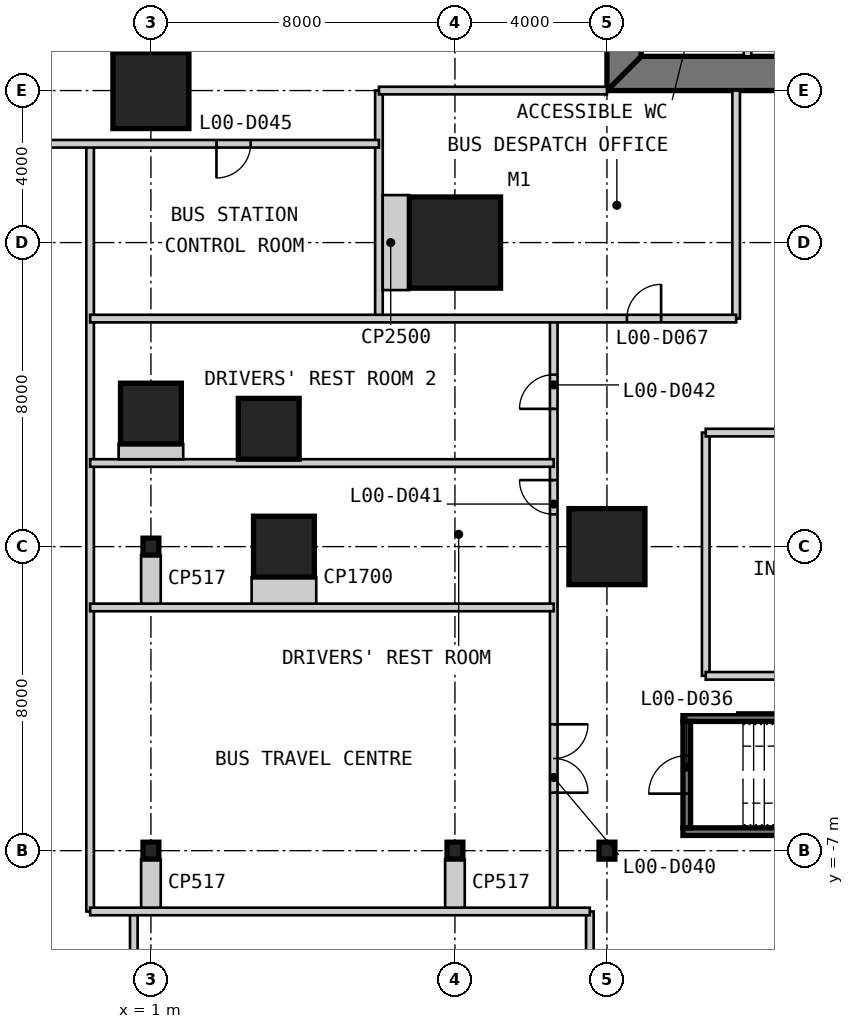
"""IFC4 building model, lengths in metres.
Left out: names, types, materials, properties, quantities, classifications, styles, units other than length and angle.
Written with IfcOpenShell. Run it as: python <this file> out.ifc"""

import sys

from ifc_helpers import new_model, si_unit, direction, frame, frame_2d, origin, origin_2d, place, context, subcontext, project, spatial, polyline, rectangle, i_section, outline, extrude, element, fill, save


model = new_model("IFC4")
c1 = context("Model", 3, precision=1e-05, world=origin(), true_north=direction((0.0, 1.0)))
c2 = subcontext(c1, "Body", "Model", "MODEL_VIEW")
j1 = project(units=[si_unit("LENGTHUNIT", "METRE"), si_unit("PLANEANGLEUNIT", "RADIAN")], contexts=[c1])
p1 = place(None, origin())
s1 = spatial("IfcSite", under=j1, at=p1, CompositionType="ELEMENT")
p2 = place(p1, origin())
s2 = spatial("IfcBuilding", under=s1, at=p2, CompositionType="ELEMENT")
p3 = place(p2, origin())
s3 = spatial("IfcBuildingStorey", under=s2, at=p3, CompositionType="ELEMENT", Elevation=0.0)
p4 = place(p3, frame((9.0, 9.0, 0.0), z_axis=(0.0, 0.0, 1.0), x_axis=(1.0, 0.0, 0.0)))
e1 = element("IfcColumn", 1, at=p4, inside=s3, PredefinedType="COLUMN", context=c2, shape_type="SweptSolid", body=[
    extrude(rectangle(XDim=2.4, YDim=2.4, at=origin_2d()), origin(), (0.0, 0.0, 1.0), 7.0),
])
p5 = place(p3, frame((4.5, 1.0, 0.0), z_axis=(0.0, 0.0, 1.0), x_axis=(1.0, 0.0, 0.0)))
e2 = element("IfcColumn", 2, at=p5, inside=s3, PredefinedType="COLUMN", context=c2, shape_type="SweptSolid", body=[
    extrude(rectangle(XDim=1.6, YDim=1.6, at=origin_2d()), origin(), (0.0, 0.0, 1.0), 7.0),
])
for number, where, z_axis, x_axis in (
    (3, (13.0, 1.0, 0.0), (0.0, 0.0, 1.0), (1.0, 0.0, 0.0)),
    (4, (1.0, 13.0, 0.0), (0.0, 0.0, 1.0), (1.0, 0.0, 0.0)),
):
    element("IfcColumn", number, at=place(p3, frame(where, z_axis=z_axis, x_axis=x_axis)), inside=s3, PredefinedType="COLUMN", context=c2, shape_type="SweptSolid", body=[
        extrude(rectangle(XDim=2.0, YDim=2.0, at=origin_2d()), origin(), (0.0, 0.0, 1.0), 7.0),
    ])
for number, where, z_axis, x_axis in (
    (5, (1.0, 4.5, 0.0), (0.0, 0.0, 1.0), (1.0, 0.0, 0.0)),
    (6, (4.1, 4.1, 0.0), (0.0, 0.0, 1.0), (1.0, 0.0, 0.0)),
):
    element("IfcColumn", number, at=place(p3, frame(where, z_axis=z_axis, x_axis=x_axis)), inside=s3, PredefinedType="COLUMN", context=c2, shape_type="SweptSolid", body=[
        extrude(rectangle(XDim=1.6, YDim=1.6, at=origin_2d()), origin(), (0.0, 0.0, 1.0), 7.0),
    ])
for number, where, z_axis, x_axis in (
    (7, (1.0, -7.0, 0.0), (0.0, 0.0, 1.0), (1.0, 0.0, 0.0)),
    (8, (1.0, 1.0, 0.0), (0.0, 0.0, 1.0), (1.0, 0.0, 0.0)),
    (9, (9.0, -7.0, 0.0), (0.0, 0.0, 1.0), (1.0, 0.0, 0.0)),
    (10, (13.0, -7.0, 0.0), (0.0, 0.0, 1.0), (1.0, 0.0, 0.0)),
):
    element("IfcColumn", number, at=place(p3, frame(where, z_axis=z_axis, x_axis=x_axis)), inside=s3, PredefinedType="COLUMN", context=c2, shape_type="SweptSolid", body=[
        extrude(i_section(OverallWidth=0.417, OverallDepth=0.445, WebThickness=0.039, FlangeThickness=0.063, at=origin_2d()), origin(), (0.0, 0.0, 1.0), 7.0),
    ])
p6 = place(p3, frame((13.0, 13.45, 0.0), z_axis=(0.0, 0.0, 1.0), x_axis=(1.0, 0.0, 0.0)))
e11 = element("IfcWall", 11, at=p6, inside=s3, PredefinedType="SHEAR", context=c2, shape_type="SweptSolid", body=[
    extrude(outline(polyline([(0.0, -0.45), (24.0, -0.45), (23.1, 0.45), (0.9, 0.45), (0.0, -0.45)])), origin(), (0.0, 0.0, 1.0), 7.0),
])
p7 = place(p6, frame((4.9, 0.0, 0.0)))
e12 = element("IfcOpeningElement", 12, at=p7, cuts=e11, PredefinedType="OPENING", context=c2, shape_type="SweptSolid", body=[
    extrude(rectangle(XDim=1.0, YDim=2.2, at=frame_2d((0.5, 1.1))), frame((0.0, 0.46, 0.0), z_axis=(0.0, -1.0, 0.0), x_axis=(1.0, 0.0, 0.0)), (0.0, 0.0, 1.0), 0.92),
])
p8 = place(p6, frame((8.9, 0.0, 0.0)))
e13 = element("IfcOpeningElement", 13, at=p8, cuts=e11, PredefinedType="OPENING", context=c2, shape_type="SweptSolid", body=[
    extrude(rectangle(XDim=1.1, YDim=2.2, at=frame_2d((0.55, 1.1))), frame((0.0, 0.46, 0.0), z_axis=(0.0, -1.0, 0.0), x_axis=(1.0, 0.0, 0.0)), (0.0, 0.0, 1.0), 0.92),
])
p9 = place(p6, frame((15.05, 0.0, 0.0)))
e14 = element("IfcOpeningElement", 14, at=p9, cuts=e11, PredefinedType="OPENING", context=c2, shape_type="SweptSolid", body=[
    extrude(rectangle(XDim=0.9, YDim=2.2, at=frame_2d((0.45, 1.1))), frame((0.0, 0.46, 0.0), z_axis=(0.0, -1.0, 0.0), x_axis=(1.0, 0.0, 0.0)), (0.0, 0.0, 1.0), 0.92),
])
p10 = place(p6, frame((17.9, 0.0, 0.0)))
e15 = element("IfcOpeningElement", 15, at=p10, cuts=e11, PredefinedType="OPENING", context=c2, shape_type="SweptSolid", body=[
    extrude(rectangle(XDim=1.0, YDim=2.2, at=frame_2d((0.5, 1.1))), frame((0.0, 0.46, 0.0), z_axis=(0.0, -1.0, 0.0), x_axis=(1.0, 0.0, 0.0)), (0.0, 0.0, 1.0), 0.92),
])
p11 = place(p6, frame((21.4, 0.0, 0.0)))
e16 = element("IfcOpeningElement", 16, at=p11, cuts=e11, PredefinedType="OPENING", context=c2, shape_type="SweptSolid", body=[
    extrude(rectangle(XDim=1.0, YDim=2.2, at=frame_2d((0.5, 1.1))), frame((0.0, 0.46, 0.0), z_axis=(0.0, -1.0, 0.0), x_axis=(1.0, 0.0, 0.0)), (0.0, 0.0, 1.0), 0.92),
])
p12 = place(p3, frame((13.45, 36.1, 0.0), z_axis=(0.0, 0.0, 1.0), x_axis=(0.0, -1.0, 0.0)))
e17 = element("IfcWall", 17, at=p12, inside=s3, PredefinedType="SHEAR", context=c2, shape_type="SweptSolid", body=[
    extrude(outline(polyline([(-0.9, -0.45), (23.1, -0.45), (22.2, 0.45), (0.0, 0.45), (-0.9, -0.45)])), origin(), (0.0, 0.0, 1.0), 7.0),
])
p13 = place(p12, frame((20.2, 0.0, 0.0)))
e18 = element("IfcOpeningElement", 18, at=p13, cuts=e17, PredefinedType="OPENING", context=c2, shape_type="SweptSolid", body=[
    extrude(rectangle(XDim=1.0, YDim=2.2, at=frame_2d((0.5, 1.1))), frame((0.0, 0.46, 0.0), z_axis=(0.0, -1.0, 0.0), x_axis=(1.0, 0.0, 0.0)), (0.0, 0.0, 1.0), 0.92),
])
p14 = place(p12, frame((17.25, 0.0, 0.0)))
e19 = element("IfcOpeningElement", 19, at=p14, cuts=e17, PredefinedType="OPENING", context=c2, shape_type="SweptSolid", body=[
    extrude(rectangle(XDim=0.9, YDim=2.2, at=frame_2d((0.45, 1.1))), frame((0.0, 0.46, 0.0), z_axis=(0.0, -1.0, 0.0), x_axis=(1.0, 0.0, 0.0)), (0.0, 0.0, 1.0), 0.92),
])
p15 = place(p3, frame((16.7, 13.9, 0.0), z_axis=(0.0, 0.0, 1.0), x_axis=(0.0, 1.0, 0.0)))
e20 = element("IfcWall", 20, at=p15, inside=s3, PredefinedType="PARTITIONING", context=c2, shape_type="SweptSolid", body=[
    extrude(rectangle(XDim=16.1, YDim=0.2, at=frame_2d((8.05, 0.0))), origin(), (0.0, 0.0, 1.0), 6.8),
])
p16 = place(p15, frame((3.8, 0.0, 0.0)))
e21 = element("IfcOpeningElement", 21, at=p16, cuts=e20, PredefinedType="OPENING", context=c2, shape_type="SweptSolid", body=[
    extrude(rectangle(XDim=0.9, YDim=2.2, at=frame_2d((0.45, 1.1))), frame((0.0, 0.11, 0.0), z_axis=(0.0, -1.0, 0.0), x_axis=(1.0, 0.0, 0.0)), (0.0, 0.0, 1.0), 0.22),
])
p17 = place(p15, frame((7.217, 0.0, 0.0)))
e22 = element("IfcOpeningElement", 22, at=p17, cuts=e20, PredefinedType="OPENING", context=c2, shape_type="SweptSolid", body=[
    extrude(rectangle(XDim=1.1, YDim=2.2, at=frame_2d((0.55, 1.1))), frame((0.0, 0.11, 0.0), z_axis=(0.0, -1.0, 0.0), x_axis=(1.0, 0.0, 0.0)), (0.0, 0.0, 1.0), 0.22),
])
p18 = place(p15, frame((10.55, 0.0, 0.0)))
e23 = element("IfcOpeningElement", 23, at=p18, cuts=e20, PredefinedType="OPENING", context=c2, shape_type="SweptSolid", body=[
    extrude(rectangle(XDim=1.1, YDim=2.2, at=frame_2d((0.55, 1.1))), frame((0.0, 0.11, 0.0), z_axis=(0.0, -1.0, 0.0), x_axis=(1.0, 0.0, 0.0)), (0.0, 0.0, 1.0), 0.22),
])
p19 = place(p15, frame((13.883, 0.0, 0.0)))
e24 = element("IfcOpeningElement", 24, at=p19, cuts=e20, PredefinedType="OPENING", context=c2, shape_type="SweptSolid", body=[
    extrude(rectangle(XDim=1.1, YDim=2.2, at=frame_2d((0.55, 1.1))), frame((0.0, 0.11, 0.0), z_axis=(0.0, -1.0, 0.0), x_axis=(1.0, 0.0, 0.0)), (0.0, 0.0, 1.0), 0.22),
])
for number, where, z_axis, x_axis in (
    (25, (15.0, -6.5, 0.0), (0.0, 0.0, 1.0), (1.0, 0.0, 0.0)),
    (26, (23.4, -3.5, 0.0), (0.0, 0.0, 1.0), (-1.0, 0.0, 0.0)),
):
    element("IfcWall", number, at=place(p3, frame(where, z_axis=z_axis, x_axis=x_axis)), inside=s3, PredefinedType="SOLIDWALL", context=c2, shape_type="SweptSolid", body=[
        extrude(rectangle(XDim=8.4, YDim=0.2, at=frame_2d((4.2, 0.0))), origin(), (0.0, 0.0, 1.0), 7.0),
    ])
p20 = place(p3, frame((15.1, -3.6, 0.0), z_axis=(0.0, 0.0, 1.0), x_axis=(0.0, -1.0, 0.0)))
e27 = element("IfcWall", 27, at=p20, inside=s3, PredefinedType="SOLIDWALL", context=c2, shape_type="SweptSolid", body=[
    extrude(rectangle(XDim=2.8, YDim=0.2, at=frame_2d((1.4, 0.0))), origin(), (0.0, 0.0, 1.0), 7.0),
])
p21 = place(p20, frame((0.9, 0.0, 0.0)))
e28 = element("IfcOpeningElement", 28, at=p21, cuts=e27, PredefinedType="OPENING", context=c2, shape_type="SweptSolid", body=[
    extrude(rectangle(XDim=1.0, YDim=2.2, at=frame_2d((0.5, 1.1))), frame((0.0, 0.11, 0.0), z_axis=(0.0, -1.0, 0.0), x_axis=(1.0, 0.0, 0.0)), (0.0, 0.0, 1.0), 0.22),
])
p22 = place(p3, frame((-0.6, -8.6, 0.0), z_axis=(0.0, 0.0, 1.0), x_axis=(0.0, 1.0, 0.0)))
e29 = element("IfcWall", 29, at=p22, inside=s3, PredefinedType="PARTITIONING", context=c2, shape_type="SweptSolid", body=[
    extrude(rectangle(XDim=20.2, YDim=0.2, at=frame_2d((10.1, 0.0))), origin(), (0.0, 0.0, 1.0), 6.7),
])
p23 = place(p3, frame((0.55, -15.25, 0.0), z_axis=(0.0, 0.0, 1.0), x_axis=(0.0, 1.0, 0.0)))
e30 = element("IfcWall", 30, at=p23, inside=s3, PredefinedType="PARTITIONING", context=c2, shape_type="SweptSolid", body=[
    extrude(rectangle(XDim=6.65, YDim=0.2, at=frame_2d((3.325, 0.0))), origin(), (0.0, 0.0, 1.0), 6.7),
])
p24 = place(p3, frame((7.0, 7.0, 0.0), z_axis=(0.0, 0.0, 1.0), x_axis=(0.0, 1.0, 0.0)))
e31 = element("IfcWall", 31, at=p24, inside=s3, PredefinedType="PARTITIONING", context=c2, shape_type="SweptSolid", body=[
    extrude(rectangle(XDim=6.0, YDim=0.2, at=frame_2d((3.0, 0.0))), origin(), (0.0, 0.0, 1.0), 6.7),
])
p25 = place(p3, frame((11.6, -8.6, 0.0), z_axis=(0.0, 0.0, 1.0), x_axis=(0.0, 1.0, 0.0)))
e32 = element("IfcWall", 32, at=p25, inside=s3, PredefinedType="PARTITIONING", context=c2, shape_type="SweptSolid", body=[
    extrude(rectangle(XDim=15.6, YDim=0.2, at=frame_2d((7.8, 0.0))), origin(), (0.0, 0.0, 1.0), 6.7),
])
p26 = place(p25, frame((3.125, 0.0, 0.0)))
e33 = element("IfcOpeningElement", 33, at=p26, cuts=e32, PredefinedType="OPENING", context=c2, shape_type="SweptSolid", body=[
    extrude(rectangle(XDim=1.8, YDim=2.4, at=frame_2d((0.9, 1.2))), frame((0.0, 0.11, 0.0), z_axis=(0.0, -1.0, 0.0), x_axis=(1.0, 0.0, 0.0)), (0.0, 0.0, 1.0), 0.22),
])
p27 = place(p25, frame((10.45, 0.0, 0.0)))
e34 = element("IfcOpeningElement", 34, at=p27, cuts=e32, PredefinedType="OPENING", context=c2, shape_type="SweptSolid", body=[
    extrude(rectangle(XDim=0.9, YDim=2.2, at=frame_2d((0.45, 1.1))), frame((0.0, 0.11, 0.0), z_axis=(0.0, -1.0, 0.0), x_axis=(1.0, 0.0, 0.0)), (0.0, 0.0, 1.0), 0.22),
])
p28 = place(p25, frame((13.225, 0.0, 0.0)))
e35 = element("IfcOpeningElement", 35, at=p28, cuts=e32, PredefinedType="OPENING", context=c2, shape_type="SweptSolid", body=[
    extrude(rectangle(XDim=0.9, YDim=2.2, at=frame_2d((0.45, 1.1))), frame((0.0, 0.11, 0.0), z_axis=(0.0, -1.0, 0.0), x_axis=(1.0, 0.0, 0.0)), (0.0, 0.0, 1.0), 0.22),
])
p29 = place(p3, frame((12.55, -15.25, 0.0), z_axis=(0.0, 0.0, 1.0), x_axis=(0.0, 1.0, 0.0)))
e36 = element("IfcWall", 36, at=p29, inside=s3, PredefinedType="PARTITIONING", context=c2, shape_type="SweptSolid", body=[
    extrude(rectangle(XDim=6.65, YDim=0.2, at=frame_2d((3.325, 0.0))), origin(), (0.0, 0.0, 1.0), 6.7),
])
p30 = place(p29, frame((2.425, 0.0, 0.0)))
e37 = element("IfcOpeningElement", 37, at=p30, cuts=e36, PredefinedType="OPENING", context=c2, shape_type="SweptSolid", body=[
    extrude(rectangle(XDim=1.8, YDim=2.4, at=frame_2d((0.9, 1.2))), frame((0.0, 0.11, 0.0), z_axis=(0.0, -1.0, 0.0), x_axis=(1.0, 0.0, 0.0)), (0.0, 0.0, 1.0), 0.22),
])
p31 = place(p3, frame((15.6, -2.4, 0.0), z_axis=(0.0, 0.0, 1.0), x_axis=(0.0, 1.0, 0.0)))
e38 = element("IfcWall", 38, at=p31, inside=s3, PredefinedType="PARTITIONING", context=c2, shape_type="SweptSolid", body=[
    extrude(rectangle(XDim=6.4, YDim=0.2, at=frame_2d((3.2, 0.0))), origin(), (0.0, 0.0, 1.0), 6.7),
])
p32 = place(p3, frame((16.4, 7.0, 0.0), z_axis=(0.0, 0.0, 1.0), x_axis=(0.0, 1.0, 0.0)))
e39 = element("IfcWall", 39, at=p32, inside=s3, PredefinedType="PARTITIONING", context=c2, shape_type="SweptSolid", body=[
    extrude(rectangle(XDim=6.0, YDim=0.2, at=frame_2d((3.0, 0.0))), origin(), (0.0, 0.0, 1.0), 6.7),
])
p33 = place(p3, frame((-0.6, -8.6, 0.0), z_axis=(0.0, 0.0, 1.0), x_axis=(1.0, 0.0, 0.0)))
e40 = element("IfcWall", 40, at=p33, inside=s3, PredefinedType="PARTITIONING", context=c2, shape_type="SweptSolid", body=[
    extrude(rectangle(XDim=13.15, YDim=0.2, at=frame_2d((6.575, 0.0))), origin(), (0.0, 0.0, 1.0), 6.7),
])
p34 = place(p3, frame((15.6, -2.4, 0.0), z_axis=(0.0, 0.0, 1.0), x_axis=(1.0, 0.0, 0.0)))
e41 = element("IfcWall", 41, at=p34, inside=s3, PredefinedType="PARTITIONING", context=c2, shape_type="SweptSolid", body=[
    extrude(rectangle(XDim=8.0, YDim=0.2, at=frame_2d((4.0, 0.0))), origin(), (0.0, 0.0, 1.0), 6.7),
])
for number, where, z_axis, x_axis in (
    (42, (-0.6, -0.6, 0.0), (0.0, 0.0, 1.0), (1.0, 0.0, 0.0)),
    (43, (-0.6, 3.2, 0.0), (0.0, 0.0, 1.0), (1.0, 0.0, 0.0)),
):
    element("IfcWall", number, at=place(p3, frame(where, z_axis=z_axis, x_axis=x_axis)), inside=s3, PredefinedType="PARTITIONING", context=c2, shape_type="SweptSolid", body=[
        extrude(rectangle(XDim=12.2, YDim=0.2, at=frame_2d((6.1, 0.0))), origin(), (0.0, 0.0, 1.0), 6.7),
    ])
p35 = place(p3, frame((15.6, 4.0, 0.0), z_axis=(0.0, 0.0, 1.0), x_axis=(1.0, 0.0, 0.0)))
e44 = element("IfcWall", 44, at=p35, inside=s3, PredefinedType="PARTITIONING", context=c2, shape_type="SweptSolid", body=[
    extrude(rectangle(XDim=8.0, YDim=0.2, at=frame_2d((4.0, 0.0))), origin(), (0.0, 0.0, 1.0), 6.7),
])
p36 = place(p35, frame((3.55, 0.0, 0.0)))
e45 = element("IfcOpeningElement", 45, at=p36, cuts=e44, PredefinedType="OPENING", context=c2, shape_type="SweptSolid", body=[
    extrude(rectangle(XDim=0.9, YDim=2.2, at=frame_2d((0.45, 1.1))), frame((0.0, 0.11, 0.0), z_axis=(0.0, -1.0, 0.0), x_axis=(1.0, 0.0, 0.0)), (0.0, 0.0, 1.0), 0.22),
])
p37 = place(p3, frame((-0.6, 7.0, 0.0), z_axis=(0.0, 0.0, 1.0), x_axis=(1.0, 0.0, 0.0)))
e46 = element("IfcWall", 46, at=p37, inside=s3, PredefinedType="PARTITIONING", context=c2, shape_type="SweptSolid", body=[
    extrude(rectangle(XDim=17.0, YDim=0.2, at=frame_2d((8.5, 0.0))), origin(), (0.0, 0.0, 1.0), 6.7),
])
p38 = place(p37, frame((14.125, 0.0, 0.0)))
e47 = element("IfcOpeningElement", 47, at=p38, cuts=e46, PredefinedType="OPENING", context=c2, shape_type="SweptSolid", body=[
    extrude(rectangle(XDim=0.9, YDim=2.2, at=frame_2d((0.45, 1.1))), frame((0.0, 0.11, 0.0), z_axis=(0.0, -1.0, 0.0), x_axis=(1.0, 0.0, 0.0)), (0.0, 0.0, 1.0), 0.22),
])
p39 = place(p3, frame((-15.25, 11.6, 0.0), z_axis=(0.0, 0.0, 1.0), x_axis=(1.0, 0.0, 0.0)))
e48 = element("IfcWall", 48, at=p39, inside=s3, PredefinedType="PARTITIONING", context=c2, shape_type="SweptSolid", body=[
    extrude(rectangle(XDim=22.25, YDim=0.2, at=frame_2d((11.125, 0.0))), origin(), (0.0, 0.0, 1.0), 6.7),
])
p40 = place(p39, frame((10.325, 0.0, 0.0)))
e49 = element("IfcOpeningElement", 49, at=p40, cuts=e48, PredefinedType="OPENING", context=c2, shape_type="SweptSolid", body=[
    extrude(rectangle(XDim=1.8, YDim=2.4, at=frame_2d((0.9, 1.2))), frame((0.0, 0.11, 0.0), z_axis=(0.0, -1.0, 0.0), x_axis=(1.0, 0.0, 0.0)), (0.0, 0.0, 1.0), 0.22),
])
p41 = place(p39, frame((3.025, 0.0, 0.0)))
e50 = element("IfcOpeningElement", 50, at=p41, cuts=e48, PredefinedType="OPENING", context=c2, shape_type="SweptSolid", body=[
    extrude(rectangle(XDim=1.8, YDim=2.4, at=frame_2d((0.9, 1.2))), frame((0.0, 0.11, 0.0), z_axis=(0.0, -1.0, 0.0), x_axis=(1.0, 0.0, 0.0)), (0.0, 0.0, 1.0), 0.22),
])
p42 = place(p39, frame((17.975, 0.0, 0.0)))
e51 = element("IfcOpeningElement", 51, at=p42, cuts=e48, PredefinedType="OPENING", context=c2, shape_type="SweptSolid", body=[
    extrude(rectangle(XDim=0.9, YDim=2.2, at=frame_2d((0.45, 1.1))), frame((0.0, 0.11, 0.0), z_axis=(0.0, -1.0, 0.0), x_axis=(1.0, 0.0, 0.0)), (0.0, 0.0, 1.0), 0.22),
])
p43 = place(p3, frame((7.0, 13.0, 0.0), z_axis=(0.0, 0.0, 1.0), x_axis=(1.0, 0.0, 0.0)))
e52 = element("IfcWall", 52, at=p43, inside=s3, PredefinedType="PARTITIONING", context=c2, shape_type="SweptSolid", body=[
    extrude(rectangle(XDim=6.0, YDim=0.2, at=frame_2d((3.0, 0.0))), origin(), (0.0, 0.0, 1.0), 5.853),
])
for number, where, z_axis, x_axis in (
    (53, (1.0, -8.5, 0.0), (0.0, 0.0, 1.0), (0.0, 1.0, 0.0)),
    (54, (9.0, -8.5, 0.0), (0.0, 0.0, 1.0), (0.0, 1.0, 0.0)),
):
    element("IfcWall", number, at=place(p3, frame(where, z_axis=z_axis, x_axis=x_axis)), inside=s3, PredefinedType="PARTITIONING", context=c2, shape_type="SweptSolid", body=[
        extrude(rectangle(XDim=1.278, YDim=0.517, at=frame_2d((0.639, 0.0))), origin(), (0.0, 0.0, 1.0), 5.954),
    ])
p44 = place(p3, frame((4.5, -0.5, 0.0), z_axis=(0.0, 0.0, 1.0), x_axis=(0.0, 1.0, 0.0)))
e55 = element("IfcWall", 55, at=p44, inside=s3, PredefinedType="PARTITIONING", context=c2, shape_type="SweptSolid", body=[
    extrude(rectangle(XDim=0.7, YDim=1.7, at=frame_2d((0.35, 0.0))), origin(), (0.0, 0.0, 1.0), 6.7),
])
p45 = place(p3, frame((1.0, -0.5, 0.0), z_axis=(0.0, 0.0, 1.0), x_axis=(0.0, 1.0, 0.0)))
e56 = element("IfcWall", 56, at=p45, inside=s3, PredefinedType="PARTITIONING", context=c2, shape_type="SweptSolid", body=[
    extrude(rectangle(XDim=1.278, YDim=0.517, at=frame_2d((0.639, 0.0))), origin(), (0.0, 0.0, 1.0), 5.954),
])
p46 = place(p3, frame((1.0, 3.3, 0.0), z_axis=(0.0, 0.0, 1.0), x_axis=(0.0, 1.0, 0.0)))
e57 = element("IfcWall", 57, at=p46, inside=s3, PredefinedType="PARTITIONING", context=c2, shape_type="SweptSolid", body=[
    extrude(rectangle(XDim=0.4, YDim=1.7, at=frame_2d((0.2, 0.0))), origin(), (0.0, 0.0, 1.0), 6.7),
])
p47 = place(p3, frame((7.1, 9.0, 0.0), z_axis=(0.0, 0.0, 1.0), x_axis=(1.0, 0.0, 0.0)))
e58 = element("IfcWall", 58, at=p47, inside=s3, PredefinedType="PARTITIONING", context=c2, shape_type="SweptSolid", body=[
    extrude(rectangle(XDim=0.7, YDim=2.5, at=frame_2d((0.35, 0.0))), origin(), (0.0, 0.0, 1.0), 6.7),
])
p48 = place(p21, frame((1.0, 0.0, 0.0), z_axis=(0.0, 0.0, 1.0), x_axis=(-1.0, 0.0, 0.0)))
e59 = element("IfcDoor", 59, at=p48, inside=s3, OperationType="SINGLE_SWING_LEFT", PredefinedType="DOOR", context=c2, shape_type="SweptSolid", body=[
    extrude(rectangle(XDim=1.0, YDim=2.2, at=frame_2d((0.5, 1.1))), frame((0.0, 0.025, 0.0), z_axis=(0.0, -1.0, 0.0), x_axis=(1.0, 0.0, 0.0)), (0.0, 0.0, 1.0), 0.05),
])
fill(e28, e59)
p49 = place(p26, frame((1.8, 0.0, 0.0), z_axis=(0.0, 0.0, 1.0), x_axis=(-1.0, 0.0, 0.0)))
e60 = element("IfcDoor", 60, at=p49, inside=s3, OperationType="DOUBLE_DOOR_SINGLE_SWING", PredefinedType="DOOR", context=c2, shape_type="SweptSolid", body=[
    extrude(rectangle(XDim=1.8, YDim=2.4, at=frame_2d((0.9, 1.2))), frame((0.0, 0.025, 0.0), z_axis=(0.0, -1.0, 0.0), x_axis=(1.0, 0.0, 0.0)), (0.0, 0.0, 1.0), 0.05),
])
fill(e33, e60)
p50 = place(p27, origin())
e61 = element("IfcDoor", 61, at=p50, inside=s3, OperationType="SINGLE_SWING_RIGHT", PredefinedType="DOOR", context=c2, shape_type="SweptSolid", body=[
    extrude(rectangle(XDim=0.9, YDim=2.2, at=frame_2d((0.45, 1.1))), frame((0.0, 0.025, 0.0), z_axis=(0.0, -1.0, 0.0), x_axis=(1.0, 0.0, 0.0)), (0.0, 0.0, 1.0), 0.05),
])
fill(e34, e61)
p51 = place(p28, origin())
e62 = element("IfcDoor", 62, at=p51, inside=s3, OperationType="SINGLE_SWING_LEFT", PredefinedType="DOOR", context=c2, shape_type="SweptSolid", body=[
    extrude(rectangle(XDim=0.9, YDim=2.2, at=frame_2d((0.45, 1.1))), frame((0.0, 0.025, 0.0), z_axis=(0.0, -1.0, 0.0), x_axis=(1.0, 0.0, 0.0)), (0.0, 0.0, 1.0), 0.05),
])
fill(e35, e62)
p52 = place(p42, frame((0.9, 0.0, 0.0), z_axis=(0.0, 0.0, 1.0), x_axis=(-1.0, 0.0, 0.0)))
e63 = element("IfcDoor", 63, at=p52, inside=s3, OperationType="SINGLE_SWING_RIGHT", PredefinedType="DOOR", context=c2, shape_type="SweptSolid", body=[
    extrude(rectangle(XDim=0.9, YDim=2.2, at=frame_2d((0.45, 1.1))), frame((0.0, 0.025, 0.0), z_axis=(0.0, -1.0, 0.0), x_axis=(1.0, 0.0, 0.0)), (0.0, 0.0, 1.0), 0.05),
])
fill(e51, e63)
p53 = place(p38, origin())
e64 = element("IfcDoor", 64, at=p53, inside=s3, OperationType="SINGLE_SWING_RIGHT", PredefinedType="DOOR", context=c2, shape_type="SweptSolid", body=[
    extrude(rectangle(XDim=0.9, YDim=2.2, at=frame_2d((0.45, 1.1))), frame((0.0, 0.025, 0.0), z_axis=(0.0, -1.0, 0.0), x_axis=(1.0, 0.0, 0.0)), (0.0, 0.0, 1.0), 0.05),
])
fill(e47, e64)
save(model, sys.argv[1])
